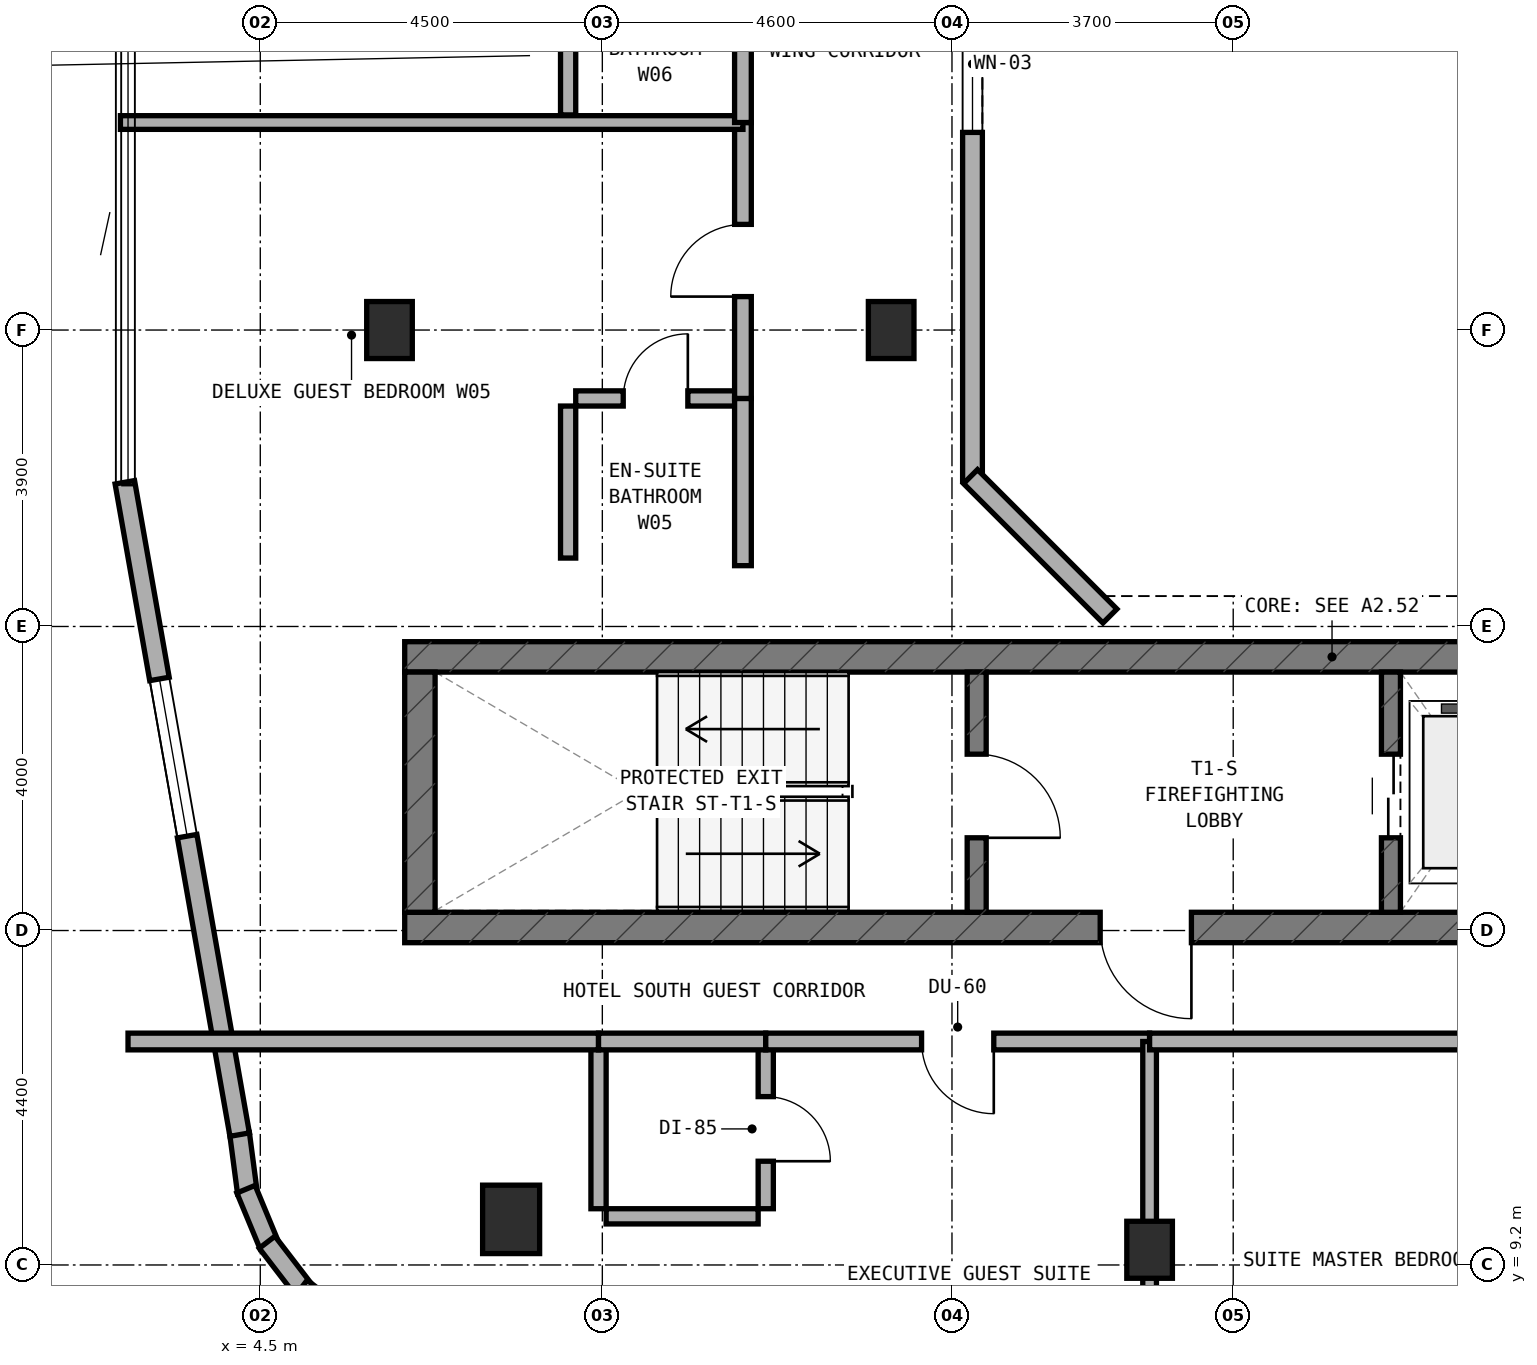
"""IFC4 building model, lengths in metres.
Left out: names, types, materials, properties, quantities, classifications, styles, units other than length and angle.
Written with IfcOpenShell. Run it as: python <this file> out.ifc"""

import sys

from ifc_helpers import new_model, si_unit, direction, frame, frame_2d, origin, origin_2d, place, context, subcontext, project, spatial, rectangle, extrude, element, fill, save


model = new_model("IFC4")
c1 = context("Model", 3, precision=1e-05, world=origin(), true_north=direction((0.0, 1.0)))
c2 = subcontext(c1, "Body", "Model", "MODEL_VIEW")
j1 = project(units=[si_unit("LENGTHUNIT", "METRE"), si_unit("PLANEANGLEUNIT", "RADIAN")], contexts=[c1])
p1 = place(None, origin())
s1 = spatial("IfcSite", under=j1, at=p1, CompositionType="ELEMENT")
p2 = place(p1, origin())
s2 = spatial("IfcBuilding", under=s1, at=p2, CompositionType="ELEMENT")
p3 = place(p2, frame((0.0, 0.0, 243.2)))
s3 = spatial("IfcBuildingStorey", under=s2, at=p3, CompositionType="ELEMENT", Elevation=243.2)
p4 = place(p3, frame((6.4, 13.64, 0.0), z_axis=(0.0, 0.0, 1.0), x_axis=(1.0, 0.0, 0.0)))
e1 = element("IfcWall", 1, at=p4, inside=s3, PredefinedType="SHEAR", context=c2, shape_type="SweptSolid", body=[
    extrude(rectangle(XDim=24.4, YDim=0.4, at=frame_2d((12.2, 0.0))), origin(), (0.0, 0.0, 1.0), 3.6),
])
p5 = place(p4, frame((9.15, 0.0, 0.0)))
e2 = element("IfcOpeningElement", 2, at=p5, cuts=e1, PredefinedType="OPENING", context=c2, shape_type="SweptSolid", body=[
    extrude(rectangle(XDim=1.2, YDim=2.15, at=frame_2d((0.6, 1.075))), frame((0.0, 0.21, 0.0), z_axis=(0.0, -1.0, 0.0), x_axis=(1.0, 0.0, 0.0)), (0.0, 0.0, 1.0), 0.42),
])
p6 = place(p4, frame((16.94, 0.0, 0.0)))
e3 = element("IfcOpeningElement", 3, at=p6, cuts=e1, PredefinedType="OPENING", context=c2, shape_type="SweptSolid", body=[
    extrude(rectangle(XDim=0.85, YDim=2.1, at=frame_2d((0.425, 1.05))), frame((0.0, 0.21, 0.0), z_axis=(0.0, -1.0, 0.0), x_axis=(1.0, 0.0, 0.0)), (0.0, 0.0, 1.0), 0.42),
])
p7 = place(p4, frame((18.783, 0.0, 0.0)))
e4 = element("IfcOpeningElement", 4, at=p7, cuts=e1, PredefinedType="OPENING", context=c2, shape_type="SweptSolid", body=[
    extrude(rectangle(XDim=1.1, YDim=2.15, at=frame_2d((0.55, 1.075))), frame((0.0, 0.21, 0.0), z_axis=(0.0, -1.0, 0.0), x_axis=(1.0, 0.0, 0.0)), (0.0, 0.0, 1.0), 0.42),
])
p8 = place(p4, frame((20.65, 0.0, 0.0)))
e5 = element("IfcOpeningElement", 5, at=p8, cuts=e1, PredefinedType="OPENING", context=c2, shape_type="SweptSolid", body=[
    extrude(rectangle(XDim=1.1, YDim=2.15, at=frame_2d((0.55, 1.075))), frame((0.0, 0.21, 0.0), z_axis=(0.0, -1.0, 0.0), x_axis=(1.0, 0.0, 0.0)), (0.0, 0.0, 1.0), 0.42),
])
p9 = place(p4, frame((22.517, 0.0, 0.0)))
e6 = element("IfcOpeningElement", 6, at=p9, cuts=e1, PredefinedType="OPENING", context=c2, shape_type="SweptSolid", body=[
    extrude(rectangle(XDim=1.1, YDim=2.15, at=frame_2d((0.55, 1.075))), frame((0.0, 0.21, 0.0), z_axis=(0.0, -1.0, 0.0), x_axis=(1.0, 0.0, 0.0)), (0.0, 0.0, 1.0), 0.42),
])
p10 = place(p3, frame((6.4, 17.2, 0.0), z_axis=(0.0, 0.0, 1.0), x_axis=(1.0, 0.0, 0.0)))
e7 = element("IfcWall", 7, at=p10, inside=s3, PredefinedType="SHEAR", context=c2, shape_type="SweptSolid", body=[
    extrude(rectangle(XDim=24.4, YDim=0.4, at=frame_2d((12.2, 0.0))), origin(), (0.0, 0.0, 1.0), 3.6),
])
p11 = place(p3, frame((6.6, 13.84, 0.0), z_axis=(0.0, 0.0, 1.0), x_axis=(0.0, 1.0, 0.0)))
e8 = element("IfcWall", 8, at=p11, inside=s3, PredefinedType="SHEAR", context=c2, shape_type="SweptSolid", body=[
    extrude(rectangle(XDim=3.16, YDim=0.4, at=frame_2d((1.58, 0.0))), origin(), (0.0, 0.0, 1.0), 3.6),
])
p12 = place(p3, frame((13.925, 13.84, 0.0), z_axis=(0.0, 0.0, 1.0), x_axis=(0.0, 1.0, 0.0)))
e9 = element("IfcWall", 9, at=p12, inside=s3, PredefinedType="STANDARD", context=c2, shape_type="SweptSolid", body=[
    extrude(rectangle(XDim=3.16, YDim=0.25, at=frame_2d((1.58, 0.0))), origin(), (0.0, 0.0, 1.0), 3.32),
])
p13 = place(p12, frame((0.98, 0.0, 0.0)))
e10 = element("IfcOpeningElement", 10, at=p13, cuts=e9, PredefinedType="OPENING", context=c2, shape_type="SweptSolid", body=[
    extrude(rectangle(XDim=1.1, YDim=2.15, at=frame_2d((0.55, 1.075))), frame((0.0, 0.135, 0.0), z_axis=(0.0, -1.0, 0.0), x_axis=(1.0, 0.0, 0.0)), (0.0, 0.0, 1.0), 0.27),
])
p14 = place(p3, frame((19.375, 13.84, 0.0), z_axis=(0.0, 0.0, 1.0), x_axis=(0.0, 1.0, 0.0)))
e11 = element("IfcWall", 11, at=p14, inside=s3, PredefinedType="STANDARD", context=c2, shape_type="SweptSolid", body=[
    extrude(rectangle(XDim=3.16, YDim=0.25, at=frame_2d((1.58, 0.0))), origin(), (0.0, 0.0, 1.0), 3.32),
])
p15 = place(p14, frame((0.98, 0.0, 0.0)))
e12 = element("IfcOpeningElement", 12, at=p15, cuts=e11, PredefinedType="OPENING", context=c2, shape_type="SweptSolid", body=[
    extrude(rectangle(XDim=1.1, YDim=2.15, at=frame_2d((0.55, 1.075))), frame((0.0, 0.135, 0.0), z_axis=(0.0, -1.0, 0.0), x_axis=(1.0, 0.0, 0.0)), (0.0, 0.0, 1.0), 0.27),
])
for number, where, z_axis, x_axis in (
    (13, (16.2, 9.4, 0.0), (0.0, 0.0, 1.0), (1.0, 0.0, 0.0)),
    (14, (6.2, 21.5, 0.0), (0.0, 0.0, 1.0), (1.0, 0.0, 0.0)),
):
    element("IfcColumn", number, at=place(p3, frame(where, z_axis=z_axis, x_axis=x_axis)), inside=s3, PredefinedType="COLUMN", context=c2, shape_type="SweptSolid", body=[
        extrude(rectangle(XDim=0.6, YDim=0.75, at=origin_2d()), origin(), (0.0, 0.0, 1.0), 3.6),
    ])
p16 = place(p3, frame((7.8, 9.8, 0.0), z_axis=(0.0, 0.0, 1.0), x_axis=(1.0, 0.0, 0.0)))
e15 = element("IfcColumn", 15, at=p16, inside=s3, PredefinedType="COLUMN", context=c2, shape_type="SweptSolid", body=[
    extrude(rectangle(XDim=0.75, YDim=0.9, at=origin_2d()), origin(), (0.0, 0.0, 1.0), 3.6),
])
p17 = place(p3, frame((12.8, 21.5, 0.0), z_axis=(0.0, 0.0, 1.0), x_axis=(1.0, 0.0, 0.0)))
e16 = element("IfcColumn", 16, at=p17, inside=s3, PredefinedType="COLUMN", context=c2, shape_type="SweptSolid", body=[
    extrude(rectangle(XDim=0.6, YDim=0.75, at=origin_2d()), origin(), (0.0, 0.0, 1.0), 3.6),
])
p18 = place(p3, frame((4.228, 10.925, 0.0), z_axis=(0.0, 0.0, 1.0), x_axis=(0.130689052056, -0.991423406861, 0.0)))
e17 = element("IfcWall", 17, at=p18, inside=s3, PredefinedType="STANDARD", context=c2, shape_type="SweptSolid", body=[
    extrude(rectangle(XDim=0.781, YDim=0.26, at=frame_2d((0.39, 0.0))), origin(), (0.0, 0.0, 1.0), 3.32),
])
p19 = place(p3, frame((4.312, 10.197, 0.0), z_axis=(0.0, 0.0, 1.0), x_axis=(0.382900540965, -0.923789573295, 0.0)))
e18 = element("IfcWall", 18, at=p19, inside=s3, PredefinedType="STANDARD", context=c2, shape_type="SweptSolid", body=[
    extrude(rectangle(XDim=0.799, YDim=0.26, at=frame_2d((0.399, 0.0))), origin(), (0.0, 0.0, 1.0), 3.32),
])
p20 = place(p3, frame((4.59, 9.499, 0.0), z_axis=(0.0, 0.0, 1.0), x_axis=(0.608823262828, -0.793305889705, 0.0)))
e19 = element("IfcWall", 19, at=p20, inside=s3, PredefinedType="STANDARD", context=c2, shape_type="SweptSolid", body=[
    extrude(rectangle(XDim=0.798, YDim=0.26, at=frame_2d((0.399, 0.0))), origin(), (0.0, 0.0, 1.0), 3.32),
])
p21 = place(p3, frame((5.038, 8.897, 0.0), z_axis=(0.0, 0.0, 1.0), x_axis=(0.793044635519, -0.60916352983, 0.0)))
e20 = element("IfcWall", 20, at=p21, inside=s3, PredefinedType="STANDARD", context=c2, shape_type="SweptSolid", body=[
    extrude(rectangle(XDim=0.798, YDim=0.26, at=frame_2d((0.399, 0.0))), origin(), (0.0, 0.0, 1.0), 3.32),
])
p22 = place(p3, frame((2.718, 19.497, 0.0), z_axis=(0.0, 0.0, 1.0), x_axis=(0.173396937698, -0.984852020355, 0.0)))
e21 = element("IfcWall", 21, at=p22, inside=s3, PredefinedType="STANDARD", context=c2, shape_type="SweptSolid", body=[
    extrude(rectangle(XDim=8.714, YDim=0.26, at=frame_2d((4.357, 0.0))), origin(), (0.0, 0.0, 1.0), 3.32),
])
p23 = place(p22, frame((2.627, 0.0, 0.85)))
e22 = element("IfcOpeningElement", 22, at=p23, cuts=e21, PredefinedType="OPENING", context=c2, shape_type="SweptSolid", body=[
    extrude(rectangle(XDim=2.1, YDim=1.5, at=frame_2d((1.05, 0.75))), frame((0.0, 0.14, 0.0), z_axis=(0.0, -1.0, 0.0), x_axis=(1.0, 0.0, 0.0)), (0.0, 0.0, 1.0), 0.28),
])
p24 = place(p3, frame((13.87, 30.49, 0.0), z_axis=(0.0, 0.0, 1.0), x_axis=(0.0, -1.0, 0.0)))
e23 = element("IfcWall", 23, at=p24, inside=s3, PredefinedType="STANDARD", context=c2, shape_type="SweptSolid", body=[
    extrude(rectangle(XDim=10.98, YDim=0.26, at=frame_2d((5.49, 0.0))), origin(), (0.0, 0.0, 1.0), 3.32),
])
p25 = place(p24, frame((4.59, 0.0, 0.85)))
e24 = element("IfcOpeningElement", 24, at=p25, cuts=e23, PredefinedType="OPENING", context=c2, shape_type="SweptSolid", body=[
    extrude(rectangle(XDim=1.8, YDim=1.5, at=frame_2d((0.9, 0.75))), frame((0.0, 0.14, 0.0), z_axis=(0.0, -1.0, 0.0), x_axis=(1.0, 0.0, 0.0)), (0.0, 0.0, 1.0), 0.28),
])
p26 = place(p3, frame((13.844, 19.572, 0.0), z_axis=(0.0, 0.0, 1.0), x_axis=(0.707106781187, -0.707106781187, 0.0)))
e25 = element("IfcWall", 25, at=p26, inside=s3, PredefinedType="STANDARD", context=c2, shape_type="SweptSolid", body=[
    extrude(rectangle(XDim=2.594, YDim=0.26, at=frame_2d((1.297, 0.0))), origin(), (0.0, 0.0, 1.0), 3.32),
])
p27 = place(p3, frame((11.15, 9.94, 0.0), z_axis=(0.0, 0.0, 1.0), x_axis=(0.0, 1.0, 0.0)))
e26 = element("IfcWall", 26, at=p27, inside=s3, PredefinedType="PLUMBINGWALL", context=c2, shape_type="SweptSolid", body=[
    extrude(rectangle(XDim=2.1, YDim=0.2, at=frame_2d((1.05, 0.0))), origin(), (0.0, 0.0, 1.0), 2.995),
])
p28 = place(p27, frame((0.625, 0.0, 0.0)))
e27 = element("IfcOpeningElement", 27, at=p28, cuts=e26, PredefinedType="OPENING", context=c2, shape_type="SweptSolid", body=[
    extrude(rectangle(XDim=0.85, YDim=2.1, at=frame_2d((0.425, 1.05))), frame((0.0, 0.11, 0.0), z_axis=(0.0, -1.0, 0.0), x_axis=(1.0, 0.0, 0.0)), (0.0, 0.0, 1.0), 0.22),
])
p29 = place(p3, frame((9.05, 9.84, 0.0), z_axis=(0.0, 0.0, 1.0), x_axis=(1.0, 0.0, 0.0)))
e28 = element("IfcWall", 28, at=p29, inside=s3, PredefinedType="PLUMBINGWALL", context=c2, shape_type="SweptSolid", body=[
    extrude(rectangle(XDim=2.0, YDim=0.2, at=frame_2d((1.0, 0.0))), origin(), (0.0, 0.0, 1.0), 3.015),
])
p30 = place(p3, frame((8.95, 9.94, 0.0), z_axis=(0.0, 0.0, 1.0), x_axis=(0.0, 1.0, 0.0)))
e29 = element("IfcWall", 29, at=p30, inside=s3, PredefinedType="PLUMBINGWALL", context=c2, shape_type="SweptSolid", body=[
    extrude(rectangle(XDim=2.1, YDim=0.2, at=frame_2d((1.05, 0.0))), origin(), (0.0, 0.0, 1.0), 2.995),
])
p31 = place(p3, frame((2.76, 12.14, 0.0), z_axis=(0.0, 0.0, 1.0), x_axis=(1.0, 0.0, 0.0)))
e30 = element("IfcWall", 30, at=p31, inside=s3, PredefinedType="SOLIDWALL", context=c2, shape_type="SweptSolid", body=[
    extrude(rectangle(XDim=6.19, YDim=0.22, at=frame_2d((3.095, 0.0))), origin(), (0.0, 0.0, 1.0), 2.745),
])
p32 = place(p3, frame((8.95, 12.14, 0.0), z_axis=(0.0, 0.0, 1.0), x_axis=(1.0, 0.0, 0.0)))
e31 = element("IfcWall", 31, at=p32, inside=s3, PredefinedType="SOLIDWALL", context=c2, shape_type="SweptSolid", body=[
    extrude(rectangle(XDim=2.2, YDim=0.22, at=frame_2d((1.1, 0.0))), origin(), (0.0, 0.0, 1.0), 3.32),
])
p33 = place(p3, frame((11.15, 12.14, 0.0), z_axis=(0.0, 0.0, 1.0), x_axis=(1.0, 0.0, 0.0)))
e32 = element("IfcWall", 32, at=p33, inside=s3, PredefinedType="SOLIDWALL", context=c2, shape_type="SweptSolid", body=[
    extrude(rectangle(XDim=5.05, YDim=0.22, at=frame_2d((2.525, 0.0))), origin(), (0.0, 0.0, 1.0), 2.745),
])
p34 = place(p33, frame((2.05, 0.0, 0.0)))
e33 = element("IfcOpeningElement", 33, at=p34, cuts=e32, PredefinedType="OPENING", context=c2, shape_type="SweptSolid", body=[
    extrude(rectangle(XDim=0.95, YDim=2.1, at=frame_2d((0.475, 1.05))), frame((0.0, 0.12, 0.0), z_axis=(0.0, -1.0, 0.0), x_axis=(1.0, 0.0, 0.0)), (0.0, 0.0, 1.0), 0.24),
])
p35 = place(p3, frame((16.2, 6.46, 0.0), z_axis=(0.0, 0.0, 1.0), x_axis=(0.0, 1.0, 0.0)))
e34 = element("IfcWall", 34, at=p35, inside=s3, PredefinedType="SOLIDWALL", context=c2, shape_type="SweptSolid", body=[
    extrude(rectangle(XDim=5.68, YDim=0.18, at=frame_2d((2.84, 0.0))), origin(), (0.0, 0.0, 1.0), 2.745),
])
p36 = place(p3, frame((16.2, 12.14, 0.0), z_axis=(0.0, 0.0, 1.0), x_axis=(1.0, 0.0, 0.0)))
e35 = element("IfcWall", 35, at=p36, inside=s3, PredefinedType="SOLIDWALL", context=c2, shape_type="SweptSolid", body=[
    extrude(rectangle(XDim=14.65, YDim=0.22, at=frame_2d((7.325, 0.0))), origin(), (0.0, 0.0, 1.0), 2.745),
])
p37 = place(p36, frame((7.13, 0.0, 0.0)))
e36 = element("IfcOpeningElement", 36, at=p37, cuts=e35, PredefinedType="OPENING", context=c2, shape_type="SweptSolid", body=[
    extrude(rectangle(XDim=0.95, YDim=2.1, at=frame_2d((0.475, 1.05))), frame((0.0, 0.12, 0.0), z_axis=(0.0, -1.0, 0.0), x_axis=(1.0, 0.0, 0.0)), (0.0, 0.0, 1.0), 0.24),
])
p38 = place(p3, frame((8.65, 20.6, 0.0), z_axis=(0.0, 0.0, 1.0), x_axis=(1.0, 0.0, 0.0)))
e37 = element("IfcWall", 37, at=p38, inside=s3, PredefinedType="PLUMBINGWALL", context=c2, shape_type="SweptSolid", body=[
    extrude(rectangle(XDim=2.1, YDim=0.2, at=frame_2d((1.05, 0.0))), origin(), (0.0, 0.0, 1.0), 3.32),
])
p39 = place(p38, frame((0.625, 0.0, 0.0)))
e38 = element("IfcOpeningElement", 38, at=p39, cuts=e37, PredefinedType="OPENING", context=c2, shape_type="SweptSolid", body=[
    extrude(rectangle(XDim=0.85, YDim=2.1, at=frame_2d((0.425, 1.05))), frame((0.0, 0.11, 0.0), z_axis=(0.0, -1.0, 0.0), x_axis=(1.0, 0.0, 0.0)), (0.0, 0.0, 1.0), 0.22),
])
p40 = place(p3, frame((8.55, 18.5, 0.0), z_axis=(0.0, 0.0, 1.0), x_axis=(0.0, 1.0, 0.0)))
e39 = element("IfcWall", 39, at=p40, inside=s3, PredefinedType="PLUMBINGWALL", context=c2, shape_type="SweptSolid", body=[
    extrude(rectangle(XDim=2.0, YDim=0.2, at=frame_2d((1.0, 0.0))), origin(), (0.0, 0.0, 1.0), 3.32),
])
p41 = place(p3, frame((10.85, 18.4, 0.0), z_axis=(0.0, 0.0, 1.0), x_axis=(0.0, 1.0, 0.0)))
e40 = element("IfcWall", 40, at=p41, inside=s3, PredefinedType="SOLIDWALL", context=c2, shape_type="SweptSolid", body=[
    extrude(rectangle(XDim=2.2, YDim=0.22, at=frame_2d((1.1, 0.0))), origin(), (0.0, 0.0, 1.0), 3.32),
])
p42 = place(p3, frame((10.85, 20.6, 0.0), z_axis=(0.0, 0.0, 1.0), x_axis=(0.0, 1.0, 0.0)))
e41 = element("IfcWall", 41, at=p42, inside=s3, PredefinedType="SOLIDWALL", context=c2, shape_type="SweptSolid", body=[
    extrude(rectangle(XDim=3.63, YDim=0.22, at=frame_2d((1.815, 0.0))), origin(), (0.0, 0.0, 1.0), 2.745),
])
p43 = place(p42, frame((1.34, 0.0, 0.0)))
e42 = element("IfcOpeningElement", 42, at=p43, cuts=e41, PredefinedType="OPENING", context=c2, shape_type="SweptSolid", body=[
    extrude(rectangle(XDim=0.95, YDim=2.1, at=frame_2d((0.475, 1.05))), frame((0.0, 0.12, 0.0), z_axis=(0.0, -1.0, 0.0), x_axis=(1.0, 0.0, 0.0)), (0.0, 0.0, 1.0), 0.24),
])
p44 = place(p3, frame((2.66, 24.23, 0.0), z_axis=(0.0, 0.0, 1.0), x_axis=(1.0, 0.0, 0.0)))
e43 = element("IfcWall", 43, at=p44, inside=s3, PredefinedType="SOLIDWALL", context=c2, shape_type="SweptSolid", body=[
    extrude(rectangle(XDim=8.19, YDim=0.18, at=frame_2d((4.095, 0.0))), origin(), (0.0, 0.0, 1.0), 3.015),
])
p45 = place(p3, frame((8.55, 24.33, 0.0), z_axis=(0.0, 0.0, 1.0), x_axis=(0.0, 1.0, 0.0)))
e44 = element("IfcWall", 44, at=p45, inside=s3, PredefinedType="PLUMBINGWALL", context=c2, shape_type="SweptSolid", body=[
    extrude(rectangle(XDim=2.0, YDim=0.2, at=frame_2d((1.0, 0.0))), origin(), (0.0, 0.0, 1.0), 3.32),
])
p46 = place(p3, frame((10.85, 24.23, 0.0), z_axis=(0.0, 0.0, 1.0), x_axis=(0.0, 1.0, 0.0)))
e45 = element("IfcWall", 45, at=p46, inside=s3, PredefinedType="SOLIDWALL", context=c2, shape_type="SweptSolid", body=[
    extrude(rectangle(XDim=2.2, YDim=0.22, at=frame_2d((1.1, 0.0))), origin(), (0.0, 0.0, 1.0), 3.32),
])
p47 = place(p23, origin())
e46 = element("IfcWindow", 46, at=p47, inside=s3, PartitioningType="SINGLE_PANEL", PredefinedType="WINDOW", context=c2, shape_type="SweptSolid", body=[
    extrude(rectangle(XDim=2.1, YDim=1.5, at=frame_2d((1.05, 0.75))), frame((0.0, 0.03, 0.0), z_axis=(0.0, -1.0, 0.0), x_axis=(1.0, 0.0, 0.0)), (0.0, 0.0, 1.0), 0.06),
])
fill(e22, e46)
p48 = place(p25, origin())
e47 = element("IfcWindow", 47, at=p48, inside=s3, PartitioningType="SINGLE_PANEL", PredefinedType="WINDOW", context=c2, shape_type="SweptSolid", body=[
    extrude(rectangle(XDim=1.8, YDim=1.5, at=frame_2d((0.9, 0.75))), frame((0.0, 0.03, 0.0), z_axis=(0.0, -1.0, 0.0), x_axis=(1.0, 0.0, 0.0)), (0.0, 0.0, 1.0), 0.06),
])
fill(e24, e47)
p49 = place(p13, frame((1.1, 0.0, 0.0), z_axis=(0.0, 0.0, 1.0), x_axis=(-1.0, 0.0, 0.0)))
e48 = element("IfcDoor", 48, at=p49, inside=s3, OperationType="SINGLE_SWING_RIGHT", PredefinedType="DOOR", context=c2, shape_type="SweptSolid", body=[
    extrude(rectangle(XDim=1.1, YDim=2.15, at=frame_2d((0.55, 1.075))), frame((0.0, 0.025, 0.0), z_axis=(0.0, -1.0, 0.0), x_axis=(1.0, 0.0, 0.0)), (0.0, 0.0, 1.0), 0.05),
])
fill(e10, e48)
p50 = place(p5, frame((1.2, 0.0, 0.0), z_axis=(0.0, 0.0, 1.0), x_axis=(-1.0, 0.0, 0.0)))
e49 = element("IfcDoor", 49, at=p50, inside=s3, OperationType="SINGLE_SWING_LEFT", PredefinedType="DOOR", context=c2, shape_type="SweptSolid", body=[
    extrude(rectangle(XDim=1.2, YDim=2.15, at=frame_2d((0.6, 1.075))), frame((0.0, 0.025, 0.0), z_axis=(0.0, -1.0, 0.0), x_axis=(1.0, 0.0, 0.0)), (0.0, 0.0, 1.0), 0.05),
])
fill(e2, e49)
p51 = place(p15, origin())
e50 = element("IfcDoor", 50, at=p51, inside=s3, OperationType="DOUBLE_DOOR_SLIDING", PredefinedType="DOOR", context=c2, shape_type="SweptSolid", body=[
    extrude(rectangle(XDim=1.1, YDim=2.15, at=frame_2d((0.55, 1.075))), frame((0.0, 0.025, 0.0), z_axis=(0.0, -1.0, 0.0), x_axis=(1.0, 0.0, 0.0)), (0.0, 0.0, 1.0), 0.05),
])
fill(e12, e50)
p52 = place(p28, frame((0.85, 0.0, 0.0), z_axis=(0.0, 0.0, 1.0), x_axis=(-1.0, 0.0, 0.0)))
e51 = element("IfcDoor", 51, at=p52, inside=s3, OperationType="SINGLE_SWING_RIGHT", PredefinedType="DOOR", context=c2, shape_type="SweptSolid", body=[
    extrude(rectangle(XDim=0.85, YDim=2.1, at=frame_2d((0.425, 1.05))), frame((0.0, 0.025, 0.0), z_axis=(0.0, -1.0, 0.0), x_axis=(1.0, 0.0, 0.0)), (0.0, 0.0, 1.0), 0.05),
])
fill(e27, e51)
p53 = place(p34, frame((0.95, 0.0, 0.0), z_axis=(0.0, 0.0, 1.0), x_axis=(-1.0, 0.0, 0.0)))
e52 = element("IfcDoor", 52, at=p53, inside=s3, OperationType="SINGLE_SWING_LEFT", PredefinedType="DOOR", context=c2, shape_type="SweptSolid", body=[
    extrude(rectangle(XDim=0.95, YDim=2.1, at=frame_2d((0.475, 1.05))), frame((0.0, 0.025, 0.0), z_axis=(0.0, -1.0, 0.0), x_axis=(1.0, 0.0, 0.0)), (0.0, 0.0, 1.0), 0.05),
])
fill(e33, e52)
p54 = place(p39, origin())
e53 = element("IfcDoor", 53, at=p54, inside=s3, OperationType="SINGLE_SWING_RIGHT", PredefinedType="DOOR", context=c2, shape_type="SweptSolid", body=[
    extrude(rectangle(XDim=0.85, YDim=2.1, at=frame_2d((0.425, 1.05))), frame((0.0, 0.025, 0.0), z_axis=(0.0, -1.0, 0.0), x_axis=(1.0, 0.0, 0.0)), (0.0, 0.0, 1.0), 0.05),
])
fill(e38, e53)
p55 = place(p43, origin())
e54 = element("IfcDoor", 54, at=p55, inside=s3, OperationType="SINGLE_SWING_LEFT", PredefinedType="DOOR", context=c2, shape_type="SweptSolid", body=[
    extrude(rectangle(XDim=0.95, YDim=2.1, at=frame_2d((0.475, 1.05))), frame((0.0, 0.025, 0.0), z_axis=(0.0, -1.0, 0.0), x_axis=(1.0, 0.0, 0.0)), (0.0, 0.0, 1.0), 0.05),
])
fill(e42, e54)
save(model, sys.argv[1])
